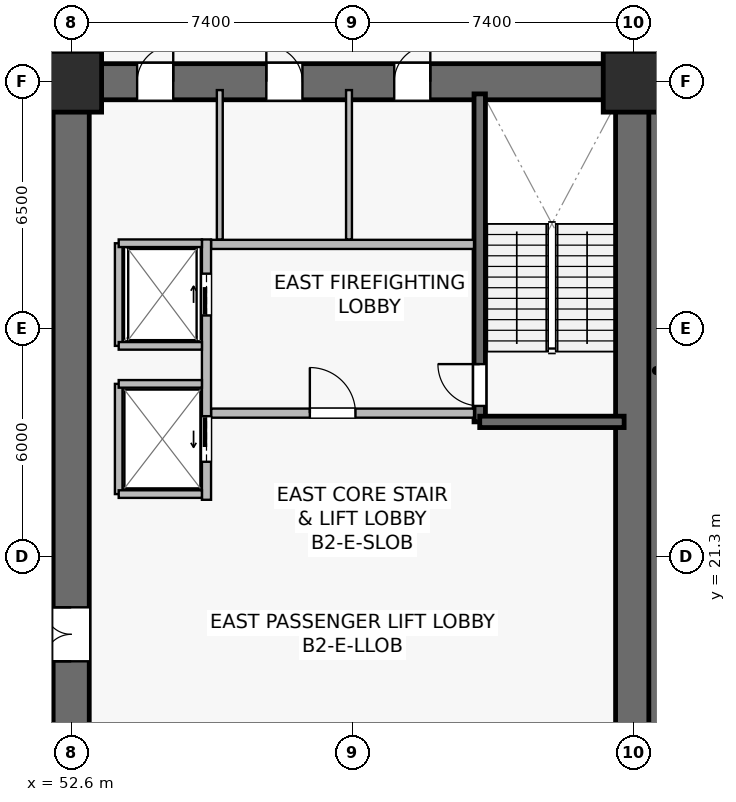
"""IFC4 building model, lengths in metres.
Left out: names, types, materials, properties, quantities, classifications, styles, units other than length and angle.
Written with IfcOpenShell. Run it as: python <this file> out.ifc"""

import sys

from ifc_helpers import new_model, si_unit, direction, frame, frame_2d, origin, origin_2d, place, context, subcontext, project, spatial, rectangle, extrude, source, transform, mapped, element, fill, save


model = new_model("IFC4")
c1 = context("Model", 3, precision=1e-05, world=origin(), true_north=direction((0.0, 1.0)))
c2 = subcontext(c1, "Body", "Model", "MODEL_VIEW")
j1 = project(units=[si_unit("LENGTHUNIT", "METRE"), si_unit("PLANEANGLEUNIT", "RADIAN")], contexts=[c1])
p1 = place(None, origin())
s1 = spatial("IfcSite", under=j1, at=p1, CompositionType="ELEMENT")
p2 = place(p1, origin())
s2 = spatial("IfcBuilding", under=s1, at=p2, CompositionType="ELEMENT")
p3 = place(p2, frame((0.0, 0.0, -9.6)))
s3 = spatial("IfcBuildingStorey", under=s2, at=p3, CompositionType="ELEMENT", Elevation=-9.6)
p4 = place(p3, frame((52.125, 33.8, 0.0), z_axis=(0.0, 0.0, 1.0), x_axis=(1.0, 0.0, 0.0)))
e1 = element("IfcWall", 1, at=p4, inside=s3, PredefinedType="SHEAR", context=c2, shape_type="SweptSolid", body=[
    extrude(rectangle(XDim=15.75, YDim=0.95, at=frame_2d((7.875, 0.0))), origin(), (0.0, 0.0, 1.0), 4.42),
])
p5 = place(p4, frame((8.975, 0.0, 0.0)))
e2 = element("IfcOpeningElement", 2, at=p5, cuts=e1, PredefinedType="OPENING", context=c2, shape_type="SweptSolid", body=[
    extrude(rectangle(XDim=0.95, YDim=2.15, at=frame_2d((0.475, 1.075))), frame((0.0, 0.485, 0.0), z_axis=(0.0, -1.0, 0.0), x_axis=(1.0, 0.0, 0.0)), (0.0, 0.0, 1.0), 0.97),
])
p6 = place(p4, frame((5.61, 0.0, 0.0)))
e3 = element("IfcOpeningElement", 3, at=p6, cuts=e1, PredefinedType="OPENING", context=c2, shape_type="SweptSolid", body=[
    extrude(rectangle(XDim=0.95, YDim=2.15, at=frame_2d((0.475, 1.075))), frame((0.0, 0.485, 0.0), z_axis=(0.0, -1.0, 0.0), x_axis=(1.0, 0.0, 0.0)), (0.0, 0.0, 1.0), 0.97),
])
p7 = place(p4, frame((2.21, 0.0, 0.0)))
e4 = element("IfcOpeningElement", 4, at=p7, cuts=e1, PredefinedType="OPENING", context=c2, shape_type="SweptSolid", body=[
    extrude(rectangle(XDim=0.95, YDim=2.15, at=frame_2d((0.475, 1.075))), frame((0.0, 0.485, 0.0), z_axis=(0.0, -1.0, 0.0), x_axis=(1.0, 0.0, 0.0)), (0.0, 0.0, 1.0), 0.97),
])
p8 = place(p3, frame((52.6, 15.275, 0.0), z_axis=(0.0, 0.0, 1.0), x_axis=(0.0, 1.0, 0.0)))
e5 = element("IfcWall", 5, at=p8, inside=s3, PredefinedType="SHEAR", context=c2, shape_type="SweptSolid", body=[
    extrude(rectangle(XDim=18.05, YDim=0.95, at=frame_2d((9.025, 0.0))), origin(), (0.0, 0.0, 1.0), 4.42),
])
p9 = place(p8, frame((3.275, 0.0, 0.0)))
e6 = element("IfcOpeningElement", 6, at=p9, cuts=e5, PredefinedType="OPENING", context=c2, shape_type="SweptSolid", body=[
    extrude(rectangle(XDim=1.42, YDim=2.2, at=frame_2d((0.71, 1.1))), frame((0.0, 0.485, 0.0), z_axis=(0.0, -1.0, 0.0), x_axis=(1.0, 0.0, 0.0)), (0.0, 0.0, 1.0), 0.97),
])
p10 = place(p3, frame((67.4, 15.275, 0.0), z_axis=(0.0, 0.0, 1.0), x_axis=(0.0, 1.0, 0.0)))
e7 = element("IfcWall", 7, at=p10, inside=s3, PredefinedType="SHEAR", context=c2, shape_type="SweptSolid", body=[
    extrude(rectangle(XDim=18.05, YDim=0.95, at=frame_2d((9.025, 0.0))), origin(), (0.0, 0.0, 1.0), 4.42),
])
p11 = place(p3, frame((63.35, 24.85, 0.0), z_axis=(0.0, 0.0, 1.0), x_axis=(0.0, 1.0, 0.0)))
e8 = element("IfcWall", 8, at=p11, inside=s3, PredefinedType="SHEAR", context=c2, shape_type="SweptSolid", body=[
    extrude(rectangle(XDim=8.63, YDim=0.3, at=frame_2d((4.315, 0.0))), origin(), (0.0, 0.0, 1.0), 4.42),
])
p12 = place(p11, frame((0.42, 0.0, 0.0)))
e9 = element("IfcOpeningElement", 9, at=p12, cuts=e8, PredefinedType="OPENING", context=c2, shape_type="SweptSolid", body=[
    extrude(rectangle(XDim=1.1, YDim=2.15, at=frame_2d((0.55, 1.075))), frame((0.0, 0.16, 0.0), z_axis=(0.0, -1.0, 0.0), x_axis=(1.0, 0.0, 0.0)), (0.0, 0.0, 1.0), 0.32),
])
p13 = place(p3, frame((63.35, 24.85, 0.0), z_axis=(0.0, 0.0, 1.0), x_axis=(1.0, 0.0, 0.0)))
e10 = element("IfcWall", 10, at=p13, inside=s3, PredefinedType="SHEAR", context=c2, shape_type="SweptSolid", body=[
    extrude(rectangle(XDim=3.8, YDim=0.3, at=frame_2d((1.9, 0.0))), origin(), (0.0, 0.0, 1.0), 4.42),
])
p14 = place(p3, frame((68.0, 6.0, 0.0), z_axis=(0.0, 0.0, 1.0), x_axis=(0.0, 1.0, 0.0)))
e11 = element("IfcWall", 11, at=p14, inside=s3, PredefinedType="SHEAR", context=c2, shape_type="SweptSolid", body=[
    extrude(rectangle(XDim=40.4, YDim=0.4, at=frame_2d((20.2, 0.0))), origin(), (0.0, 0.0, 1.0), 4.42),
])
m1 = source(origin(), c2, "Body", "SweptSolid", [
    extrude(rectangle(XDim=1.6, YDim=1.6, at=origin_2d()), origin(), (0.0, 0.0, 1.0), 4.8),
])
for number, where, z_axis, x_axis in (
    (12, (52.6, 33.8, 0.0), (0.0, 0.0, 1.0), (1.0, 0.0, 0.0)),
    (13, (67.4, 33.8, 0.0), (0.0, 0.0, 1.0), (1.0, 0.0, 0.0)),
):
    element("IfcColumn", number, at=place(p3, frame(where, z_axis=z_axis, x_axis=x_axis)), inside=s3, PredefinedType="COLUMN", context=c2, shape_type="MappedRepresentation", body=[
        mapped(m1, transform((0.0, 0.0, 0.0), scale=1.0)),
    ])
p15 = place(p3, frame((56.28, 25.08, 0.0), z_axis=(0.0, 0.0, 1.0), x_axis=(1.0, 0.0, 0.0)))
e14 = element("IfcWall", 14, at=p15, inside=s3, PredefinedType="SOLIDWALL", context=c2, shape_type="SweptSolid", body=[
    extrude(rectangle(XDim=6.92, YDim=0.24, at=frame_2d((3.46, 0.0))), origin(), (0.0, 0.0, 1.0), 3.655),
])
p16 = place(p15, frame((2.6, 0.0, 0.0)))
e15 = element("IfcOpeningElement", 15, at=p16, cuts=e14, PredefinedType="OPENING", context=c2, shape_type="SweptSolid", body=[
    extrude(rectangle(XDim=1.2, YDim=2.16, at=frame_2d((0.6, 1.08))), frame((0.0, 0.13, 0.0), z_axis=(0.0, -1.0, 0.0), x_axis=(1.0, 0.0, 0.0)), (0.0, 0.0, 1.0), 0.26),
])
p17 = place(p3, frame((56.28, 29.52, 0.0), z_axis=(0.0, 0.0, 1.0), x_axis=(1.0, 0.0, 0.0)))
e16 = element("IfcWall", 16, at=p17, inside=s3, PredefinedType="SOLIDWALL", context=c2, shape_type="SweptSolid", body=[
    extrude(rectangle(XDim=6.92, YDim=0.24, at=frame_2d((3.46, 0.0))), origin(), (0.0, 0.0, 1.0), 3.655),
])
p18 = place(p3, frame((56.16, 22.8, 0.0), z_axis=(0.0, 0.0, 1.0), x_axis=(0.0, 1.0, 0.0)))
e17 = element("IfcWall", 17, at=p18, inside=s3, PredefinedType="SOLIDWALL", context=c2, shape_type="SweptSolid", body=[
    extrude(rectangle(XDim=6.85, YDim=0.24, at=frame_2d((3.425, 0.0))), origin(), (0.0, 0.0, 1.0), 3.505),
])
p19 = place(p18, frame((4.85, 0.0, 0.0)))
e18 = element("IfcOpeningElement", 18, at=p19, cuts=e17, PredefinedType="OPENING", context=c2, shape_type="SweptSolid", body=[
    extrude(rectangle(XDim=1.1, YDim=2.22, at=frame_2d((0.55, 1.11))), frame((0.0, 0.13, 0.0), z_axis=(0.0, -1.0, 0.0), x_axis=(1.0, 0.0, 0.0)), (0.0, 0.0, 1.0), 0.26),
])
p20 = place(p18, frame((1.0, 0.0, 0.0)))
e19 = element("IfcOpeningElement", 19, at=p20, cuts=e17, PredefinedType="OPENING", context=c2, shape_type="SweptSolid", body=[
    extrude(rectangle(XDim=1.2, YDim=2.22, at=frame_2d((0.6, 1.11))), frame((0.0, 0.13, 0.0), z_axis=(0.0, -1.0, 0.0), x_axis=(1.0, 0.0, 0.0)), (0.0, 0.0, 1.0), 0.26),
])
p21 = place(p3, frame((53.85, 26.85, 0.0), z_axis=(0.0, 0.0, 1.0), x_axis=(0.0, 1.0, 0.0)))
e20 = element("IfcWall", 20, at=p21, inside=s3, PredefinedType="SOLIDWALL", context=c2, shape_type="SweptSolid", body=[
    extrude(rectangle(XDim=2.7, YDim=0.2, at=frame_2d((1.35, 0.0))), origin(), (0.0, 0.0, 1.0), 4.42),
])
p22 = place(p3, frame((53.85, 29.55, 0.0), z_axis=(0.0, 0.0, 1.0), x_axis=(1.0, 0.0, 0.0)))
e21 = element("IfcWall", 21, at=p22, inside=s3, PredefinedType="SOLIDWALL", context=c2, shape_type="SweptSolid", body=[
    extrude(rectangle(XDim=2.19, YDim=0.2, at=frame_2d((1.095, 0.0))), origin(), (0.0, 0.0, 1.0), 4.42),
])
p23 = place(p3, frame((53.85, 26.85, 0.0), z_axis=(0.0, 0.0, 1.0), x_axis=(1.0, 0.0, 0.0)))
e22 = element("IfcWall", 22, at=p23, inside=s3, PredefinedType="SOLIDWALL", context=c2, shape_type="SweptSolid", body=[
    extrude(rectangle(XDim=2.19, YDim=0.2, at=frame_2d((1.095, 0.0))), origin(), (0.0, 0.0, 1.0), 3.817),
])
p24 = place(p3, frame((53.85, 22.95, 0.0), z_axis=(0.0, 0.0, 1.0), x_axis=(0.0, 1.0, 0.0)))
e23 = element("IfcWall", 23, at=p24, inside=s3, PredefinedType="SOLIDWALL", context=c2, shape_type="SweptSolid", body=[
    extrude(rectangle(XDim=2.9, YDim=0.2, at=frame_2d((1.45, 0.0))), origin(), (0.0, 0.0, 1.0), 3.505),
])
for number, where, z_axis, x_axis in (
    (24, (53.85, 25.85, 0.0), (0.0, 0.0, 1.0), (1.0, 0.0, 0.0)),
    (25, (53.85, 22.95, 0.0), (0.0, 0.0, 1.0), (1.0, 0.0, 0.0)),
):
    element("IfcWall", number, at=place(p3, frame(where, z_axis=z_axis, x_axis=x_axis)), inside=s3, PredefinedType="SOLIDWALL", context=c2, shape_type="SweptSolid", body=[
        extrude(rectangle(XDim=2.19, YDim=0.2, at=frame_2d((1.095, 0.0))), origin(), (0.0, 0.0, 1.0), 4.42),
    ])
p25 = place(p3, frame((59.91, 29.65, 0.0), z_axis=(0.0, 0.0, 1.0), x_axis=(0.0, 1.0, 0.0)))
e26 = element("IfcWall", 26, at=p25, inside=s3, PredefinedType="PLUMBINGWALL", context=c2, shape_type="SweptSolid", body=[
    extrude(rectangle(XDim=3.93, YDim=0.155, at=frame_2d((1.965, 0.0))), origin(), (0.0, 0.0, 1.0), 3.655),
])
p26 = place(p3, frame((56.51, 29.65, 0.0), z_axis=(0.0, 0.0, 1.0), x_axis=(0.0, 1.0, 0.0)))
e27 = element("IfcWall", 27, at=p26, inside=s3, PredefinedType="PLUMBINGWALL", context=c2, shape_type="SweptSolid", body=[
    extrude(rectangle(XDim=3.93, YDim=0.155, at=frame_2d((1.965, 0.0))), origin(), (0.0, 0.0, 1.0), 4.42),
])
m2 = source(origin(), c2, "Body", "SweptSolid", [
    extrude(rectangle(XDim=1.1, YDim=2.15, at=frame_2d((0.55, 1.075))), frame((0.0, 0.025, 0.0), z_axis=(0.0, -1.0, 0.0), x_axis=(1.0, 0.0, 0.0)), (0.0, 0.0, 1.0), 0.05),
])
p27 = place(p12, origin())
e28 = element("IfcDoor", 28, at=p27, inside=s3, OperationType="SINGLE_SWING_RIGHT", PredefinedType="DOOR", context=c2, shape_type="MappedRepresentation", body=[
    mapped(m2, transform((0.0, 0.0, 0.0), scale=1.0)),
])
fill(e9, e28)
m3 = source(origin(), c2, "Body", "SweptSolid", [
    extrude(rectangle(XDim=1.2, YDim=2.16, at=frame_2d((0.6, 1.08))), frame((0.0, 0.025, 0.0), z_axis=(0.0, -1.0, 0.0), x_axis=(1.0, 0.0, 0.0)), (0.0, 0.0, 1.0), 0.05),
])
p28 = place(p16, origin())
e29 = element("IfcDoor", 29, at=p28, inside=s3, OperationType="SINGLE_SWING_LEFT", PredefinedType="DOOR", context=c2, shape_type="MappedRepresentation", body=[
    mapped(m3, transform((0.0, 0.0, 0.0), scale=1.0)),
])
fill(e15, e29)
m4 = source(origin(), c2, "Body", "SweptSolid", [
    extrude(rectangle(XDim=1.1, YDim=2.22, at=frame_2d((0.55, 1.11))), frame((0.0, 0.025, 0.0), z_axis=(0.0, -1.0, 0.0), x_axis=(1.0, 0.0, 0.0)), (0.0, 0.0, 1.0), 0.05),
])
p29 = place(p19, origin())
e30 = element("IfcDoor", 30, at=p29, inside=s3, OperationType="SLIDING_TO_RIGHT", PredefinedType="USERDEFINED", context=c2, shape_type="MappedRepresentation", body=[
    mapped(m4, transform((0.0, 0.0, 0.0), scale=1.0)),
])
fill(e18, e30)
m5 = source(origin(), c2, "Body", "SweptSolid", [
    extrude(rectangle(XDim=1.2, YDim=2.22, at=frame_2d((0.6, 1.11))), frame((0.0, 0.025, 0.0), z_axis=(0.0, -1.0, 0.0), x_axis=(1.0, 0.0, 0.0)), (0.0, 0.0, 1.0), 0.05),
])
p30 = place(p20, origin())
e31 = element("IfcDoor", 31, at=p30, inside=s3, OperationType="SLIDING_TO_LEFT", PredefinedType="USERDEFINED", context=c2, shape_type="MappedRepresentation", body=[
    mapped(m5, transform((0.0, 0.0, 0.0), scale=1.0)),
])
fill(e19, e31)
m6 = source(origin(), c2, "Body", "SweptSolid", [
    extrude(rectangle(XDim=1.42, YDim=2.2, at=frame_2d((0.71, 1.1))), frame((0.0, 0.025, 0.0), z_axis=(0.0, -1.0, 0.0), x_axis=(1.0, 0.0, 0.0)), (0.0, 0.0, 1.0), 0.05),
])
p31 = place(p9, origin())
e32 = element("IfcDoor", 32, at=p31, inside=s3, OperationType="DOUBLE_DOOR_SINGLE_SWING", PredefinedType="DOOR", context=c2, shape_type="MappedRepresentation", body=[
    mapped(m6, transform((0.0, 0.0, 0.0), scale=1.0)),
])
fill(e6, e32)
m7 = source(origin(), c2, "Body", "SweptSolid", [
    extrude(rectangle(XDim=0.95, YDim=2.15, at=frame_2d((0.475, 1.075))), frame((0.0, 0.025, 0.0), z_axis=(0.0, -1.0, 0.0), x_axis=(1.0, 0.0, 0.0)), (0.0, 0.0, 1.0), 0.05),
])
p32 = place(p5, origin())
e33 = element("IfcDoor", 33, at=p32, inside=s3, OperationType="SINGLE_SWING_RIGHT", PredefinedType="DOOR", context=c2, shape_type="MappedRepresentation", body=[
    mapped(m7, transform((0.0, 0.0, 0.0), scale=1.0)),
])
fill(e2, e33)
p33 = place(p6, origin())
e34 = element("IfcDoor", 34, at=p33, inside=s3, OperationType="SINGLE_SWING_LEFT", PredefinedType="DOOR", context=c2, shape_type="MappedRepresentation", body=[
    mapped(m7, transform((0.0, 0.0, 0.0), scale=1.0)),
])
fill(e3, e34)
p34 = place(p7, origin())
e35 = element("IfcDoor", 35, at=p34, inside=s3, OperationType="SINGLE_SWING_RIGHT", PredefinedType="DOOR", context=c2, shape_type="MappedRepresentation", body=[
    mapped(m7, transform((0.0, 0.0, 0.0), scale=1.0)),
])
fill(e4, e35)
save(model, sys.argv[1])
